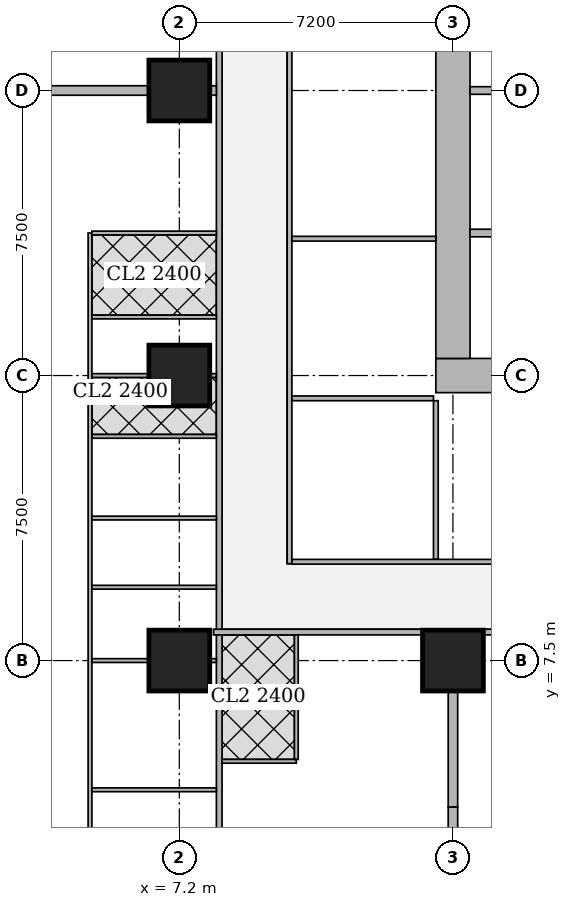
"""IFC4 building model, lengths in metres.
Left out: names, types, materials, properties, quantities, classifications, styles, units other than length and angle.
Written with IfcOpenShell. Run it as: python <this file> out.ifc"""

import sys

from ifc_helpers import new_model, si_unit, direction, frame, frame_2d, origin, origin_2d, place, context, subcontext, project, spatial, rectangle, extrude, element, fill, save


model = new_model("IFC4")
c1 = context("Model", 3, precision=1e-05, world=origin(), true_north=direction((0.0, 1.0)))
c2 = subcontext(c1, "Body", "Model", "MODEL_VIEW")
j1 = project(units=[si_unit("LENGTHUNIT", "METRE"), si_unit("PLANEANGLEUNIT", "RADIAN")], contexts=[c1])
p1 = place(None, origin())
s1 = spatial("IfcSite", under=j1, at=p1, CompositionType="ELEMENT")
p2 = place(p1, origin())
s2 = spatial("IfcBuilding", under=s1, at=p2, CompositionType="ELEMENT")
p3 = place(p2, frame((0.0, 0.0, 81.65)))
s3 = spatial("IfcBuildingStorey", under=s2, at=p3, CompositionType="ELEMENT", Elevation=81.65)
for number, where, z_axis, x_axis in (
    (1, (7.2, 7.5, 0.0), (0.0, 0.0, 1.0), (1.0, 0.0, 0.0)),
    (2, (14.4, 7.5, 0.0), (0.0, 0.0, 1.0), (1.0, 0.0, 0.0)),
    (3, (7.2, 15.0, 0.0), (0.0, 0.0, 1.0), (1.0, 0.0, 0.0)),
    (4, (7.2, 22.5, 0.0), (0.0, 0.0, 1.0), (1.0, 0.0, 0.0)),
):
    element("IfcColumn", number, at=place(p3, frame(where, z_axis=z_axis, x_axis=x_axis)), inside=s3, PredefinedType="COLUMN", context=c2, shape_type="SweptSolid", body=[
        extrude(rectangle(XDim=1.6, YDim=1.6, at=origin_2d()), origin(), (0.0, 0.0, 1.0), 3.75),
    ])
p4 = place(p3, frame((13.95, 15.0, 0.0), z_axis=(0.0, 0.0, 1.0), x_axis=(1.0, 0.0, 0.0)))
e5 = element("IfcWall", 5, at=p4, inside=s3, PredefinedType="SHEAR", context=c2, shape_type="SweptSolid", body=[
    extrude(rectangle(XDim=15.3, YDim=0.9, at=frame_2d((7.65, 0.0))), origin(), (0.0, 0.0, 1.0), 3.75),
])
p5 = place(p4, frame((4.45, 0.0, 0.0)))
e6 = element("IfcOpeningElement", 6, at=p5, cuts=e5, PredefinedType="OPENING", context=c2, shape_type="SweptSolid", body=[
    extrude(rectangle(XDim=1.8, YDim=2.1, at=frame_2d((0.9, 1.05))), frame((0.0, 0.46, 0.0), z_axis=(0.0, -1.0, 0.0), x_axis=(1.0, 0.0, 0.0)), (0.0, 0.0, 1.0), 0.92),
])
p6 = place(p4, frame((10.7, 0.0, 0.0)))
e7 = element("IfcOpeningElement", 7, at=p6, cuts=e5, PredefinedType="OPENING", context=c2, shape_type="SweptSolid", body=[
    extrude(rectangle(XDim=1.1, YDim=2.1, at=frame_2d((0.55, 1.05))), frame((0.0, 0.46, 0.0), z_axis=(0.0, -1.0, 0.0), x_axis=(1.0, 0.0, 0.0)), (0.0, 0.0, 1.0), 0.92),
])
p7 = place(p3, frame((14.4, 15.45, 0.0), z_axis=(0.0, 0.0, 1.0), x_axis=(0.0, 1.0, 0.0)))
e8 = element("IfcWall", 8, at=p7, inside=s3, PredefinedType="SHEAR", context=c2, shape_type="SweptSolid", body=[
    extrude(rectangle(XDim=14.1, YDim=0.9, at=frame_2d((7.05, 0.0))), origin(), (0.0, 0.0, 1.0), 3.75),
])
p8 = place(p3, frame((8.25, 2.126, 0.0), z_axis=(0.0, 0.0, 1.0), x_axis=(0.0, 1.0, 0.0)))
e9 = element("IfcWall", 9, at=p8, inside=s3, PredefinedType="SOLIDWALL", context=c2, shape_type="SweptSolid", body=[
    extrude(rectangle(XDim=40.773, YDim=0.15, at=frame_2d((20.386, 0.0))), origin(), (0.0, 0.0, 1.0), 3.5),
])
p9 = place(p8, frame((17.787, 0.0, 0.0)))
e10 = element("IfcOpeningElement", 10, at=p9, cuts=e9, PredefinedType="OPENING", context=c2, shape_type="SweptSolid", body=[
    extrude(rectangle(XDim=1.0, YDim=2.1, at=frame_2d((0.5, 1.05))), frame((0.0, 0.085, 0.0), z_axis=(0.0, -1.0, 0.0), x_axis=(1.0, 0.0, 0.0)), (0.0, 0.0, 1.0), 0.17),
])
p10 = place(p8, frame((21.962, 0.0, 0.0)))
e11 = element("IfcOpeningElement", 11, at=p10, cuts=e9, PredefinedType="OPENING", context=c2, shape_type="SweptSolid", body=[
    extrude(rectangle(XDim=1.0, YDim=2.1, at=frame_2d((0.5, 1.05))), frame((0.0, 0.085, 0.0), z_axis=(0.0, -1.0, 0.0), x_axis=(1.0, 0.0, 0.0)), (0.0, 0.0, 1.0), 0.17),
])
p11 = place(p8, frame((32.787, 0.0, 0.0)))
e12 = element("IfcOpeningElement", 12, at=p11, cuts=e9, PredefinedType="OPENING", context=c2, shape_type="SweptSolid", body=[
    extrude(rectangle(XDim=1.0, YDim=2.1, at=frame_2d((0.5, 1.05))), frame((0.0, 0.085, 0.0), z_axis=(0.0, -1.0, 0.0), x_axis=(1.0, 0.0, 0.0)), (0.0, 0.0, 1.0), 0.17),
])
p12 = place(p3, frame((20.799, 8.25, 0.0), z_axis=(0.0, 0.0, 1.0), x_axis=(-1.0, 0.0, 0.0)))
e13 = element("IfcWall", 13, at=p12, inside=s3, PredefinedType="SOLIDWALL", context=c2, shape_type="SweptSolid", body=[
    extrude(rectangle(XDim=5.598, YDim=0.15, at=frame_2d((2.799, 0.0))), origin(), (0.0, 0.0, 1.0), 3.5),
])
p13 = place(p12, frame((3.899, 0.0, 0.0)))
e14 = element("IfcOpeningElement", 14, at=p13, cuts=e13, PredefinedType="OPENING", context=c2, shape_type="SweptSolid", body=[
    extrude(rectangle(XDim=1.0, YDim=2.1, at=frame_2d((0.5, 1.05))), frame((0.0, 0.085, 0.0), z_axis=(0.0, -1.0, 0.0), x_axis=(1.0, 0.0, 0.0)), (0.0, 0.0, 1.0), 0.17),
])
p14 = place(p3, frame((13.599, 8.25, 0.0), z_axis=(0.0, 0.0, 1.0), x_axis=(-1.0, 0.0, 0.0)))
e15 = element("IfcWall", 15, at=p14, inside=s3, PredefinedType="SOLIDWALL", context=c2, shape_type="SweptSolid", body=[
    extrude(rectangle(XDim=5.499, YDim=0.15, at=frame_2d((2.75, 0.0))), origin(), (0.0, 0.0, 1.0), 3.5),
])
p15 = place(p14, frame((0.76, 0.0, 0.0)))
e16 = element("IfcOpeningElement", 16, at=p15, cuts=e15, PredefinedType="OPENING", context=c2, shape_type="SweptSolid", body=[
    extrude(rectangle(XDim=1.0, YDim=2.1, at=frame_2d((0.5, 1.05))), frame((0.0, 0.085, 0.0), z_axis=(0.0, -1.0, 0.0), x_axis=(1.0, 0.0, 0.0)), (0.0, 0.0, 1.0), 0.17),
])
p16 = place(p3, frame((4.85, 2.812, 0.0), z_axis=(0.0, 0.0, 1.0), x_axis=(0.0, 1.0, 0.0)))
e17 = element("IfcWall", 17, at=p16, inside=s3, PredefinedType="PARTITIONING", context=c2, shape_type="SweptSolid", body=[
    extrude(rectangle(XDim=15.938, YDim=0.1, at=frame_2d((7.969, 0.0))), origin(), (0.0, 0.0, 1.0), 3.5),
])
p17 = place(p16, frame((14.383, 0.0, 0.0)))
e18 = element("IfcOpeningElement", 18, at=p17, cuts=e17, PredefinedType="OPENING", context=c2, shape_type="SweptSolid", body=[
    extrude(rectangle(XDim=0.9, YDim=2.1, at=frame_2d((0.45, 1.05))), frame((0.0, 0.06, 0.0), z_axis=(0.0, -1.0, 0.0), x_axis=(1.0, 0.0, 0.0)), (0.0, 0.0, 1.0), 0.12),
])
p18 = place(p16, frame((10.938, 0.0, 0.0)))
e19 = element("IfcOpeningElement", 19, at=p18, cuts=e17, PredefinedType="OPENING", context=c2, shape_type="SweptSolid", body=[
    extrude(rectangle(XDim=0.9, YDim=2.1, at=frame_2d((0.45, 1.05))), frame((0.0, 0.06, 0.0), z_axis=(0.0, -1.0, 0.0), x_axis=(1.0, 0.0, 0.0)), (0.0, 0.0, 1.0), 0.12),
])
p19 = place(p16, frame((7.078, 0.0, 0.0)))
e20 = element("IfcOpeningElement", 20, at=p19, cuts=e17, PredefinedType="OPENING", context=c2, shape_type="SweptSolid", body=[
    extrude(rectangle(XDim=0.9, YDim=2.1, at=frame_2d((0.45, 1.05))), frame((0.0, 0.06, 0.0), z_axis=(0.0, -1.0, 0.0), x_axis=(1.0, 0.0, 0.0)), (0.0, 0.0, 1.0), 0.12),
])
p20 = place(p16, frame((2.363, 0.0, 0.0)))
e21 = element("IfcOpeningElement", 21, at=p20, cuts=e17, PredefinedType="OPENING", context=c2, shape_type="SweptSolid", body=[
    extrude(rectangle(XDim=0.9, YDim=2.1, at=frame_2d((0.45, 1.05))), frame((0.0, 0.06, 0.0), z_axis=(0.0, -1.0, 0.0), x_axis=(1.0, 0.0, 0.0)), (0.0, 0.0, 1.0), 0.12),
])
p21 = place(p16, frame((12.508, 0.0, 0.0)))
e22 = element("IfcOpeningElement", 22, at=p21, cuts=e17, PredefinedType="OPENING", context=c2, shape_type="SweptSolid", body=[
    extrude(rectangle(XDim=0.9, YDim=2.1, at=frame_2d((0.45, 1.05))), frame((0.0, 0.06, 0.0), z_axis=(0.0, -1.0, 0.0), x_axis=(1.0, 0.0, 0.0)), (0.0, 0.0, 1.0), 0.12),
])
p22 = place(p16, frame((9.063, 0.0, 0.0)))
e23 = element("IfcOpeningElement", 23, at=p22, cuts=e17, PredefinedType="OPENING", context=c2, shape_type="SweptSolid", body=[
    extrude(rectangle(XDim=0.9, YDim=2.1, at=frame_2d((0.45, 1.05))), frame((0.0, 0.06, 0.0), z_axis=(0.0, -1.0, 0.0), x_axis=(1.0, 0.0, 0.0)), (0.0, 0.0, 1.0), 0.12),
])
p23 = place(p16, frame((5.203, 0.0, 0.0)))
e24 = element("IfcOpeningElement", 24, at=p23, cuts=e17, PredefinedType="OPENING", context=c2, shape_type="SweptSolid", body=[
    extrude(rectangle(XDim=0.9, YDim=2.1, at=frame_2d((0.45, 1.05))), frame((0.0, 0.06, 0.0), z_axis=(0.0, -1.0, 0.0), x_axis=(1.0, 0.0, 0.0)), (0.0, 0.0, 1.0), 0.12),
])
p24 = place(p3, frame((4.9, 7.5, 0.0), z_axis=(0.0, 0.0, 1.0), x_axis=(1.0, 0.0, 0.0)))
e25 = element("IfcWall", 25, at=p24, inside=s3, PredefinedType="PARTITIONING", context=c2, shape_type="SweptSolid", body=[
    extrude(rectangle(XDim=1.499, YDim=0.1, at=frame_2d((0.75, 0.0))), origin(), (0.0, 0.0, 1.0), 3.5),
])
p25 = place(p3, frame((8.001, 7.5, 0.0), z_axis=(0.0, 0.0, 1.0), x_axis=(1.0, 0.0, 0.0)))
e26 = element("IfcWall", 26, at=p25, inside=s3, PredefinedType="PARTITIONING", context=c2, shape_type="SweptSolid", body=[
    extrude(rectangle(XDim=0.174, YDim=0.1, at=frame_2d((0.087, 0.0))), origin(), (0.0, 0.0, 1.0), 3.5),
])
p26 = place(p3, frame((4.9, 11.25, 0.0), z_axis=(0.0, 0.0, 1.0), x_axis=(1.0, 0.0, 0.0)))
e27 = element("IfcWall", 27, at=p26, inside=s3, PredefinedType="PARTITIONING", context=c2, shape_type="SweptSolid", body=[
    extrude(rectangle(XDim=3.275, YDim=0.1, at=frame_2d((1.638, 0.0))), origin(), (0.0, 0.0, 1.0), 3.5),
])
p27 = place(p3, frame((4.9, 15.0, 0.0), z_axis=(0.0, 0.0, 1.0), x_axis=(1.0, 0.0, 0.0)))
e28 = element("IfcWall", 28, at=p27, inside=s3, PredefinedType="PARTITIONING", context=c2, shape_type="SweptSolid", body=[
    extrude(rectangle(XDim=1.499, YDim=0.1, at=frame_2d((0.75, 0.0))), origin(), (0.0, 0.0, 1.0), 3.5),
])
p28 = place(p3, frame((8.001, 15.0, 0.0), z_axis=(0.0, 0.0, 1.0), x_axis=(1.0, 0.0, 0.0)))
e29 = element("IfcWall", 29, at=p28, inside=s3, PredefinedType="PARTITIONING", context=c2, shape_type="SweptSolid", body=[
    extrude(rectangle(XDim=0.174, YDim=0.1, at=frame_2d((0.087, 0.0))), origin(), (0.0, 0.0, 1.0), 3.5),
])
for number, where, z_axis, x_axis in (
    (30, (4.9, 18.75, 0.0), (0.0, 0.0, 1.0), (1.0, 0.0, 0.0)),
    (31, (4.9, 16.54, 0.0), (0.0, 0.0, 1.0), (1.0, 0.0, 0.0)),
    (32, (4.9, 13.4, 0.0), (0.0, 0.0, 1.0), (1.0, 0.0, 0.0)),
    (33, (4.9, 9.43, 0.0), (0.0, 0.0, 1.0), (1.0, 0.0, 0.0)),
):
    element("IfcWall", number, at=place(p3, frame(where, z_axis=z_axis, x_axis=x_axis)), inside=s3, PredefinedType="PARTITIONING", context=c2, shape_type="SweptSolid", body=[
        extrude(rectangle(XDim=3.275, YDim=0.1, at=frame_2d((1.638, 0.0))), origin(), (0.0, 0.0, 1.0), 3.5),
    ])
p29 = place(p3, frame((3.65, 22.5, 0.0), z_axis=(0.0, 0.0, 1.0), x_axis=(1.0, 0.0, 0.0)))
e34 = element("IfcWall", 34, at=p29, inside=s3, PredefinedType="SOLIDWALL", context=c2, shape_type="SweptSolid", body=[
    extrude(rectangle(XDim=2.749, YDim=0.25, at=frame_2d((1.375, 0.0))), origin(), (0.0, 0.0, 1.0), 3.5),
])
p30 = place(p3, frame((8.001, 22.5, 0.0), z_axis=(0.0, 0.0, 1.0), x_axis=(1.0, 0.0, 0.0)))
e35 = element("IfcWall", 35, at=p30, inside=s3, PredefinedType="SOLIDWALL", context=c2, shape_type="SweptSolid", body=[
    extrude(rectangle(XDim=0.174, YDim=0.25, at=frame_2d((0.087, 0.0))), origin(), (0.0, 0.0, 1.0), 3.5),
])
p31 = place(p3, frame((10.279, 4.85, 0.0), z_axis=(0.0, 0.0, 1.0), x_axis=(-1.0, 0.0, 0.0)))
e36 = element("IfcWall", 36, at=p31, inside=s3, PredefinedType="PARTITIONING", context=c2, shape_type="SweptSolid", body=[
    extrude(rectangle(XDim=1.954, YDim=0.1, at=frame_2d((0.977, 0.0))), origin(), (0.0, 0.0, 1.0), 3.5),
])
p32 = place(p31, frame((0.579, 0.0, 0.0)))
e37 = element("IfcOpeningElement", 37, at=p32, cuts=e36, PredefinedType="OPENING", context=c2, shape_type="SweptSolid", body=[
    extrude(rectangle(XDim=0.9, YDim=2.1, at=frame_2d((0.45, 1.05))), frame((0.0, 0.06, 0.0), z_axis=(0.0, -1.0, 0.0), x_axis=(1.0, 0.0, 0.0)), (0.0, 0.0, 1.0), 0.12),
])
p33 = place(p3, frame((10.279, 4.9, 0.0), z_axis=(0.0, 0.0, 1.0), x_axis=(0.0, 1.0, 0.0)))
e38 = element("IfcWall", 38, at=p33, inside=s3, PredefinedType="PARTITIONING", context=c2, shape_type="SweptSolid", body=[
    extrude(rectangle(XDim=3.275, YDim=0.1, at=frame_2d((1.638, 0.0))), origin(), (0.0, 0.0, 1.0), 3.5),
])
p34 = place(p3, frame((14.4, 2.326, 0.0), z_axis=(0.0, 0.0, 1.0), x_axis=(0.0, 1.0, 0.0)))
e39 = element("IfcWall", 39, at=p34, inside=s3, PredefinedType="SOLIDWALL", context=c2, shape_type="SweptSolid", body=[
    extrude(rectangle(XDim=1.324, YDim=0.25, at=frame_2d((0.662, 0.0))), origin(), (0.0, 0.0, 1.0), 3.5),
])
p35 = place(p3, frame((14.4, 3.65, 0.0), z_axis=(0.0, 0.0, 1.0), x_axis=(0.0, 1.0, 0.0)))
e40 = element("IfcWall", 40, at=p35, inside=s3, PredefinedType="SOLIDWALL", context=c2, shape_type="SweptSolid", body=[
    extrude(rectangle(XDim=3.049, YDim=0.25, at=frame_2d((1.524, 0.0))), origin(), (0.0, 0.0, 1.0), 3.5),
])
p36 = place(p3, frame((8.175, 4.1, 0.0), z_axis=(0.0, 0.0, 1.0), x_axis=(-1.0, 0.0, 0.0)))
e41 = element("IfcWall", 41, at=p36, inside=s3, PredefinedType="PARTITIONING", context=c2, shape_type="SweptSolid", body=[
    extrude(rectangle(XDim=3.275, YDim=0.1, at=frame_2d((1.638, 0.0))), origin(), (0.0, 0.0, 1.0), 3.5),
])
p37 = place(p36, frame((1.175, 0.0, 0.0)))
e42 = element("IfcOpeningElement", 42, at=p37, cuts=e41, PredefinedType="OPENING", context=c2, shape_type="SweptSolid", body=[
    extrude(rectangle(XDim=0.9, YDim=2.1, at=frame_2d((0.45, 1.05))), frame((0.0, 0.06, 0.0), z_axis=(0.0, -1.0, 0.0), x_axis=(1.0, 0.0, 0.0)), (0.0, 0.0, 1.0), 0.12),
])
p38 = place(p3, frame((10.1, 10.05, 0.0), z_axis=(0.0, 0.0, 1.0), x_axis=(0.0, 1.0, 0.0)))
e43 = element("IfcWall", 43, at=p38, inside=s3, PredefinedType="PARTITIONING", context=c2, shape_type="SweptSolid", body=[
    extrude(rectangle(XDim=16.05, YDim=0.125, at=frame_2d((8.025, 0.0))), origin(), (0.0, 0.0, 1.0), 3.5),
])
p39 = place(p38, frame((1.675, 0.0, 0.0)))
e44 = element("IfcOpeningElement", 44, at=p39, cuts=e43, PredefinedType="OPENING", context=c2, shape_type="SweptSolid", body=[
    extrude(rectangle(XDim=1.0, YDim=2.1, at=frame_2d((0.5, 1.05))), frame((0.0, 0.073, 0.0), z_axis=(0.0, -1.0, 0.0), x_axis=(1.0, 0.0, 0.0)), (0.0, 0.0, 1.0), 0.145),
])
p40 = place(p38, frame((5.95, 0.0, 0.0)))
e45 = element("IfcOpeningElement", 45, at=p40, cuts=e43, PredefinedType="OPENING", context=c2, shape_type="SweptSolid", body=[
    extrude(rectangle(XDim=1.0, YDim=2.1, at=frame_2d((0.5, 1.05))), frame((0.0, 0.073, 0.0), z_axis=(0.0, -1.0, 0.0), x_axis=(1.0, 0.0, 0.0)), (0.0, 0.0, 1.0), 0.145),
])
p41 = place(p38, frame((11.8, 0.0, 0.0)))
e46 = element("IfcOpeningElement", 46, at=p41, cuts=e43, PredefinedType="OPENING", context=c2, shape_type="SweptSolid", body=[
    extrude(rectangle(XDim=1.0, YDim=2.1, at=frame_2d((0.5, 1.05))), frame((0.0, 0.073, 0.0), z_axis=(0.0, -1.0, 0.0), x_axis=(1.0, 0.0, 0.0)), (0.0, 0.0, 1.0), 0.145),
])
p42 = place(p3, frame((10.163, 14.4, 0.0), z_axis=(0.0, 0.0, 1.0), x_axis=(1.0, 0.0, 0.0)))
e47 = element("IfcWall", 47, at=p42, inside=s3, PredefinedType="PARTITIONING", context=c2, shape_type="SweptSolid", body=[
    extrude(rectangle(XDim=3.725, YDim=0.125, at=frame_2d((1.862, 0.0))), origin(), (0.0, 0.0, 1.0), 3.5),
])
p43 = place(p3, frame((10.163, 18.6, 0.0), z_axis=(0.0, 0.0, 1.0), x_axis=(1.0, 0.0, 0.0)))
e48 = element("IfcWall", 48, at=p43, inside=s3, PredefinedType="PARTITIONING", context=c2, shape_type="SweptSolid", body=[
    extrude(rectangle(XDim=3.787, YDim=0.125, at=frame_2d((1.894, 0.0))), origin(), (0.0, 0.0, 1.0), 3.5),
])
p44 = place(p3, frame((13.95, 10.163, 0.0), z_axis=(0.0, 0.0, 1.0), x_axis=(0.0, 1.0, 0.0)))
e49 = element("IfcWall", 49, at=p44, inside=s3, PredefinedType="PARTITIONING", context=c2, shape_type="SweptSolid", body=[
    extrude(rectangle(XDim=4.175, YDim=0.125, at=frame_2d((2.087, 0.0))), origin(), (0.0, 0.0, 1.0), 3.5),
])
p45 = place(p3, frame((10.163, 10.1, 0.0), z_axis=(0.0, 0.0, 1.0), x_axis=(1.0, 0.0, 0.0)))
e50 = element("IfcWall", 50, at=p45, inside=s3, PredefinedType="PARTITIONING", context=c2, shape_type="SweptSolid", body=[
    extrude(rectangle(XDim=11.287, YDim=0.125, at=frame_2d((5.644, 0.0))), origin(), (0.0, 0.0, 1.0), 3.5),
])
p46 = place(p45, frame((7.832, 0.0, 0.0)))
e51 = element("IfcOpeningElement", 51, at=p46, cuts=e50, PredefinedType="OPENING", context=c2, shape_type="SweptSolid", body=[
    extrude(rectangle(XDim=1.8, YDim=2.1, at=frame_2d((0.9, 1.05))), frame((0.0, 0.073, 0.0), z_axis=(0.0, -1.0, 0.0), x_axis=(1.0, 0.0, 0.0)), (0.0, 0.0, 1.0), 0.145),
])
for number, where, z_axis, x_axis in (
    (52, (14.85, 18.75, 0.0), (0.0, 0.0, 1.0), (1.0, 0.0, 0.0)),
    (53, (14.85, 22.5, 0.0), (0.0, 0.0, 1.0), (1.0, 0.0, 0.0)),
):
    element("IfcWall", number, at=place(p3, frame(where, z_axis=z_axis, x_axis=x_axis)), inside=s3, PredefinedType="SOLIDWALL", context=c2, shape_type="SweptSolid", body=[
        extrude(rectangle(XDim=1.95, YDim=0.2, at=frame_2d((0.975, 0.0))), origin(), (0.0, 0.0, 1.0), 3.5),
    ])
p47 = place(p17, origin())
e54 = element("IfcDoor", 54, at=p47, inside=s3, OperationType="SINGLE_SWING_LEFT", PredefinedType="DOOR", context=c2, shape_type="SweptSolid", body=[
    extrude(rectangle(XDim=0.9, YDim=2.1, at=frame_2d((0.45, 1.05))), frame((0.0, 0.025, 0.0), z_axis=(0.0, -1.0, 0.0), x_axis=(1.0, 0.0, 0.0)), (0.0, 0.0, 1.0), 0.05),
])
fill(e18, e54)
p48 = place(p18, origin())
e55 = element("IfcDoor", 55, at=p48, inside=s3, OperationType="SINGLE_SWING_RIGHT", PredefinedType="DOOR", context=c2, shape_type="SweptSolid", body=[
    extrude(rectangle(XDim=0.9, YDim=2.1, at=frame_2d((0.45, 1.05))), frame((0.0, 0.025, 0.0), z_axis=(0.0, -1.0, 0.0), x_axis=(1.0, 0.0, 0.0)), (0.0, 0.0, 1.0), 0.05),
])
fill(e19, e55)
p49 = place(p19, origin())
e56 = element("IfcDoor", 56, at=p49, inside=s3, OperationType="SINGLE_SWING_RIGHT", PredefinedType="DOOR", context=c2, shape_type="SweptSolid", body=[
    extrude(rectangle(XDim=0.9, YDim=2.1, at=frame_2d((0.45, 1.05))), frame((0.0, 0.025, 0.0), z_axis=(0.0, -1.0, 0.0), x_axis=(1.0, 0.0, 0.0)), (0.0, 0.0, 1.0), 0.05),
])
fill(e20, e56)
p50 = place(p20, origin())
e57 = element("IfcDoor", 57, at=p50, inside=s3, OperationType="SINGLE_SWING_RIGHT", PredefinedType="DOOR", context=c2, shape_type="SweptSolid", body=[
    extrude(rectangle(XDim=0.9, YDim=2.1, at=frame_2d((0.45, 1.05))), frame((0.0, 0.025, 0.0), z_axis=(0.0, -1.0, 0.0), x_axis=(1.0, 0.0, 0.0)), (0.0, 0.0, 1.0), 0.05),
])
fill(e21, e57)
p51 = place(p21, origin())
e58 = element("IfcDoor", 58, at=p51, inside=s3, OperationType="SINGLE_SWING_LEFT", PredefinedType="DOOR", context=c2, shape_type="SweptSolid", body=[
    extrude(rectangle(XDim=0.9, YDim=2.1, at=frame_2d((0.45, 1.05))), frame((0.0, 0.025, 0.0), z_axis=(0.0, -1.0, 0.0), x_axis=(1.0, 0.0, 0.0)), (0.0, 0.0, 1.0), 0.05),
])
fill(e22, e58)
p52 = place(p22, origin())
e59 = element("IfcDoor", 59, at=p52, inside=s3, OperationType="SINGLE_SWING_LEFT", PredefinedType="DOOR", context=c2, shape_type="SweptSolid", body=[
    extrude(rectangle(XDim=0.9, YDim=2.1, at=frame_2d((0.45, 1.05))), frame((0.0, 0.025, 0.0), z_axis=(0.0, -1.0, 0.0), x_axis=(1.0, 0.0, 0.0)), (0.0, 0.0, 1.0), 0.05),
])
fill(e23, e59)
p53 = place(p23, origin())
e60 = element("IfcDoor", 60, at=p53, inside=s3, OperationType="SINGLE_SWING_RIGHT", PredefinedType="DOOR", context=c2, shape_type="SweptSolid", body=[
    extrude(rectangle(XDim=0.9, YDim=2.1, at=frame_2d((0.45, 1.05))), frame((0.0, 0.025, 0.0), z_axis=(0.0, -1.0, 0.0), x_axis=(1.0, 0.0, 0.0)), (0.0, 0.0, 1.0), 0.05),
])
fill(e24, e60)
p54 = place(p9, origin())
e61 = element("IfcDoor", 61, at=p54, inside=s3, OperationType="SINGLE_SWING_LEFT", PredefinedType="DOOR", context=c2, shape_type="SweptSolid", body=[
    extrude(rectangle(XDim=1.0, YDim=2.1, at=frame_2d((0.5, 1.05))), frame((0.0, 0.025, 0.0), z_axis=(0.0, -1.0, 0.0), x_axis=(1.0, 0.0, 0.0)), (0.0, 0.0, 1.0), 0.05),
])
fill(e10, e61)
p55 = place(p32, origin())
e62 = element("IfcDoor", 62, at=p55, inside=s3, OperationType="SINGLE_SWING_LEFT", PredefinedType="DOOR", context=c2, shape_type="SweptSolid", body=[
    extrude(rectangle(XDim=0.9, YDim=2.1, at=frame_2d((0.45, 1.05))), frame((0.0, 0.025, 0.0), z_axis=(0.0, -1.0, 0.0), x_axis=(1.0, 0.0, 0.0)), (0.0, 0.0, 1.0), 0.05),
])
fill(e37, e62)
p56 = place(p15, origin())
e63 = element("IfcDoor", 63, at=p56, inside=s3, OperationType="SINGLE_SWING_LEFT", PredefinedType="DOOR", context=c2, shape_type="SweptSolid", body=[
    extrude(rectangle(XDim=1.0, YDim=2.1, at=frame_2d((0.5, 1.05))), frame((0.0, 0.025, 0.0), z_axis=(0.0, -1.0, 0.0), x_axis=(1.0, 0.0, 0.0)), (0.0, 0.0, 1.0), 0.05),
])
fill(e16, e63)
p57 = place(p37, origin())
e64 = element("IfcDoor", 64, at=p57, inside=s3, OperationType="SINGLE_SWING_RIGHT", PredefinedType="DOOR", context=c2, shape_type="SweptSolid", body=[
    extrude(rectangle(XDim=0.9, YDim=2.1, at=frame_2d((0.45, 1.05))), frame((0.0, 0.025, 0.0), z_axis=(0.0, -1.0, 0.0), x_axis=(1.0, 0.0, 0.0)), (0.0, 0.0, 1.0), 0.05),
])
fill(e42, e64)
p58 = place(p39, origin())
e65 = element("IfcDoor", 65, at=p58, inside=s3, OperationType="SINGLE_SWING_RIGHT", PredefinedType="DOOR", context=c2, shape_type="SweptSolid", body=[
    extrude(rectangle(XDim=1.0, YDim=2.1, at=frame_2d((0.5, 1.05))), frame((0.0, 0.025, 0.0), z_axis=(0.0, -1.0, 0.0), x_axis=(1.0, 0.0, 0.0)), (0.0, 0.0, 1.0), 0.05),
])
fill(e44, e65)
p59 = place(p40, origin())
e66 = element("IfcDoor", 66, at=p59, inside=s3, OperationType="SINGLE_SWING_RIGHT", PredefinedType="DOOR", context=c2, shape_type="SweptSolid", body=[
    extrude(rectangle(XDim=1.0, YDim=2.1, at=frame_2d((0.5, 1.05))), frame((0.0, 0.025, 0.0), z_axis=(0.0, -1.0, 0.0), x_axis=(1.0, 0.0, 0.0)), (0.0, 0.0, 1.0), 0.05),
])
fill(e45, e66)
p60 = place(p41, origin())
e67 = element("IfcDoor", 67, at=p60, inside=s3, OperationType="SINGLE_SWING_LEFT", PredefinedType="DOOR", context=c2, shape_type="SweptSolid", body=[
    extrude(rectangle(XDim=1.0, YDim=2.1, at=frame_2d((0.5, 1.05))), frame((0.0, 0.025, 0.0), z_axis=(0.0, -1.0, 0.0), x_axis=(1.0, 0.0, 0.0)), (0.0, 0.0, 1.0), 0.05),
])
fill(e46, e67)
save(model, sys.argv[1])
